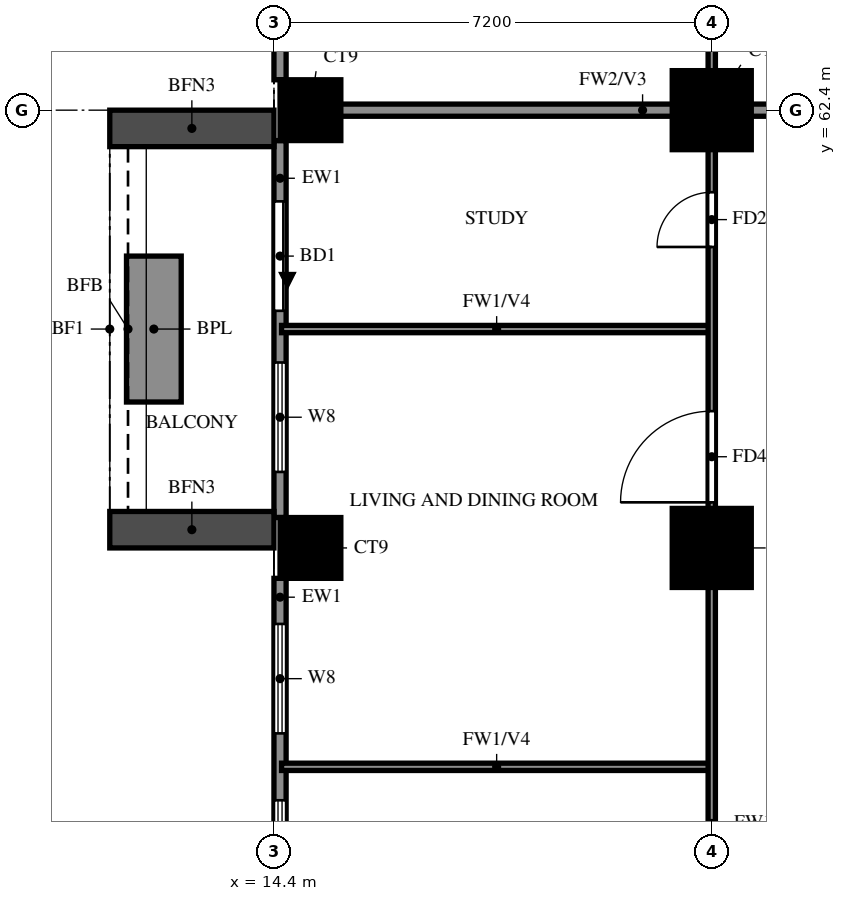
"""IFC4 building model, lengths in metres.
Left out: names, types, materials, properties, quantities, classifications, styles, units other than length and angle.
Written with IfcOpenShell. Run it as: python <this file> out.ifc"""

import sys

from ifc_helpers import new_model, si_unit, direction, frame, frame_2d, origin, origin_2d, place, context, subcontext, project, spatial, rectangle, extrude, source, transform, mapped, element, fill, save


model = new_model("IFC4")
c1 = context("Model", 3, precision=1e-05, world=origin(), true_north=direction((0.0, 1.0)))
c2 = subcontext(c1, "Body", "Model", "MODEL_VIEW")
j1 = project(units=[si_unit("LENGTHUNIT", "METRE"), si_unit("PLANEANGLEUNIT", "RADIAN")], contexts=[c1])
p1 = place(None, origin())
s1 = spatial("IfcSite", under=j1, at=p1, CompositionType="ELEMENT")
p2 = place(p1, origin())
s2 = spatial("IfcBuilding", under=s1, at=p2, CompositionType="ELEMENT")
p3 = place(p2, frame((0.0, 0.0, 90.0)))
s3 = spatial("IfcBuildingStorey", under=s2, at=p3, CompositionType="ELEMENT", Elevation=90.0)
m1 = source(origin(), c2, "Body", "SweptSolid", [
    extrude(rectangle(XDim=1.0, YDim=1.0, at=origin_2d()), origin(), (0.0, 0.0, 1.0), 3.18),
])
p4 = place(p3, frame((15.0, 55.2, 0.0), z_axis=(0.0, 0.0, 1.0), x_axis=(1.0, 0.0, 0.0)))
e1 = element("IfcColumn", 1, at=p4, inside=s3, PredefinedType="COLUMN", context=c2, shape_type="MappedRepresentation", body=[
    mapped(m1, transform((0.0, 0.0, 0.0))),
])
m2 = source(origin(), c2, "Body", "SweptSolid", [
    extrude(rectangle(XDim=1.3, YDim=1.3, at=origin_2d()), origin(), (0.0, 0.0, 1.0), 3.18),
])
p5 = place(p3, frame((21.6, 55.2, 0.0), z_axis=(0.0, 0.0, 1.0), x_axis=(1.0, 0.0, 0.0)))
e2 = element("IfcColumn", 2, at=p5, inside=s3, PredefinedType="COLUMN", context=c2, shape_type="MappedRepresentation", body=[
    mapped(m2, transform((0.0, 0.0, 0.0))),
])
p6 = place(p3, frame((15.0, 62.4, 0.0), z_axis=(0.0, 0.0, 1.0), x_axis=(1.0, 0.0, 0.0)))
e3 = element("IfcColumn", 3, at=p6, inside=s3, PredefinedType="COLUMN", context=c2, shape_type="MappedRepresentation", body=[
    mapped(m1, transform((0.0, 0.0, 0.0))),
])
p7 = place(p3, frame((21.6, 62.4, 0.0), z_axis=(0.0, 0.0, 1.0), x_axis=(1.0, 0.0, 0.0)))
e4 = element("IfcColumn", 4, at=p7, inside=s3, PredefinedType="COLUMN", context=c2, shape_type="MappedRepresentation", body=[
    mapped(m2, transform((0.0, 0.0, 0.0))),
])
p8 = place(p3, frame((14.5, 69.1, 0.0), z_axis=(0.0, 0.0, 1.0), x_axis=(0.0, -1.0, 0.0)))
e5 = element("IfcWall", 5, at=p8, inside=s3, PredefinedType="SOLIDWALL", context=c2, shape_type="SweptSolid", body=[
    extrude(rectangle(XDim=6.2, YDim=0.2, at=frame_2d((3.1, 0.0))), origin(), (0.0, 0.0, 1.0), 3.18),
])
p9 = place(p8, frame((3.65, 0.0, 0.6)))
e6 = element("IfcOpeningElement", 6, at=p9, cuts=e5, PredefinedType="OPENING", context=c2, shape_type="SweptSolid", body=[
    extrude(rectangle(XDim=1.8, YDim=2.4, at=frame_2d((0.9, 1.2))), frame((0.0, 0.11, 0.0), z_axis=(0.0, -1.0, 0.0), x_axis=(1.0, 0.0, 0.0)), (0.0, 0.0, 1.0), 0.22),
])
p10 = place(p8, frame((1.2, 0.0, 1.5)))
e7 = element("IfcOpeningElement", 7, at=p10, cuts=e5, PredefinedType="OPENING", context=c2, shape_type="SweptSolid", body=[
    extrude(rectangle(XDim=0.9, YDim=0.9, at=frame_2d((0.45, 0.45))), frame((0.0, 0.11, 0.0), z_axis=(0.0, -1.0, 0.0), x_axis=(1.0, 0.0, 0.0)), (0.0, 0.0, 1.0), 0.22),
])
p11 = place(p3, frame((14.5, 61.9, 0.0), z_axis=(0.0, 0.0, 1.0), x_axis=(0.0, -1.0, 0.0)))
e8 = element("IfcWall", 8, at=p11, inside=s3, PredefinedType="SOLIDWALL", context=c2, shape_type="SweptSolid", body=[
    extrude(rectangle(XDim=6.2, YDim=0.2, at=frame_2d((3.1, 0.0))), origin(), (0.0, 0.0, 1.0), 3.18),
])
p12 = place(p11, frame((1.0, 0.0, 0.0)))
e9 = element("IfcOpeningElement", 9, at=p12, cuts=e8, PredefinedType="OPENING", context=c2, shape_type="SweptSolid", body=[
    extrude(rectangle(XDim=1.8, YDim=2.4, at=frame_2d((0.9, 1.2))), frame((0.0, 0.11, 0.0), z_axis=(0.0, -1.0, 0.0), x_axis=(1.0, 0.0, 0.0)), (0.0, 0.0, 1.0), 0.22),
])
p13 = place(p11, frame((3.65, 0.0, 0.6)))
e10 = element("IfcOpeningElement", 10, at=p13, cuts=e8, PredefinedType="OPENING", context=c2, shape_type="SweptSolid", body=[
    extrude(rectangle(XDim=1.8, YDim=2.4, at=frame_2d((0.9, 1.2))), frame((0.0, 0.11, 0.0), z_axis=(0.0, -1.0, 0.0), x_axis=(1.0, 0.0, 0.0)), (0.0, 0.0, 1.0), 0.22),
])
p14 = place(p3, frame((14.5, 54.7, 0.0), z_axis=(0.0, 0.0, 1.0), x_axis=(0.0, -1.0, 0.0)))
e11 = element("IfcWall", 11, at=p14, inside=s3, PredefinedType="SOLIDWALL", context=c2, shape_type="SweptSolid", body=[
    extrude(rectangle(XDim=6.2, YDim=0.2, at=frame_2d((3.1, 0.0))), origin(), (0.0, 0.0, 1.0), 3.18),
])
p15 = place(p14, frame((3.65, 0.0, 0.6)))
e12 = element("IfcOpeningElement", 12, at=p15, cuts=e11, PredefinedType="OPENING", context=c2, shape_type="SweptSolid", body=[
    extrude(rectangle(XDim=1.8, YDim=2.4, at=frame_2d((0.9, 1.2))), frame((0.0, 0.11, 0.0), z_axis=(0.0, -1.0, 0.0), x_axis=(1.0, 0.0, 0.0)), (0.0, 0.0, 1.0), 0.22),
])
p16 = place(p14, frame((0.75, 0.0, 0.6)))
e13 = element("IfcOpeningElement", 13, at=p16, cuts=e11, PredefinedType="OPENING", context=c2, shape_type="SweptSolid", body=[
    extrude(rectangle(XDim=1.8, YDim=2.4, at=frame_2d((0.9, 1.2))), frame((0.0, 0.11, 0.0), z_axis=(0.0, -1.0, 0.0), x_axis=(1.0, 0.0, 0.0)), (0.0, 0.0, 1.0), 0.22),
])
for number, where, z_axis, x_axis in (
    (14, (14.4, 62.1, 0.0), (0.0, 0.0, 1.0), (-1.0, 0.0, 0.0)),
    (15, (14.4, 55.5, 0.0), (0.0, 0.0, 1.0), (-1.0, 0.0, 0.0)),
):
    element("IfcWall", number, at=place(p3, frame(where, z_axis=z_axis, x_axis=x_axis)), inside=s3, PredefinedType="SOLIDWALL", context=c2, shape_type="SweptSolid", body=[
        extrude(rectangle(XDim=2.7, YDim=0.6, at=frame_2d((1.35, 0.0))), origin(), (0.0, 0.0, 1.0), 2.85),
    ])
p17 = place(p3, frame((12.425, 60.0, 0.0), z_axis=(0.0, 0.0, 1.0), x_axis=(0.0, -1.0, 0.0)))
e16 = element("IfcWall", 16, at=p17, inside=s3, PredefinedType="SOLIDWALL", context=c2, shape_type="SweptSolid", body=[
    extrude(rectangle(XDim=2.4, YDim=0.9, at=frame_2d((1.2, 0.0))), origin(), (0.0, 0.0, 1.0), 0.9),
])
p18 = place(p3, frame((14.525, 62.4, 0.0), z_axis=(0.0, 0.0, 1.0), x_axis=(1.0, 0.0, 0.0)))
e17 = element("IfcWall", 17, at=p18, inside=s3, PredefinedType="SOLIDWALL", context=c2, shape_type="SweptSolid", body=[
    extrude(rectangle(XDim=11.875, YDim=0.2, at=frame_2d((5.938, 0.0))), origin(), (0.0, 0.0, 1.0), 3.18),
])
for number, where, z_axis, x_axis in (
    (18, (14.525, 51.6, 0.0), (0.0, 0.0, 1.0), (1.0, 0.0, 0.0)),
    (19, (14.525, 58.8, 0.0), (0.0, 0.0, 1.0), (1.0, 0.0, 0.0)),
):
    element("IfcWall", number, at=place(p3, frame(where, z_axis=z_axis, x_axis=x_axis)), inside=s3, PredefinedType="PARTITIONING", context=c2, shape_type="SweptSolid", body=[
        extrude(rectangle(XDim=7.075, YDim=0.12, at=frame_2d((3.538, 0.0))), origin(), (0.0, 0.0, 1.0), 2.28),
    ])
p19 = place(p3, frame((21.6, 33.725, 0.0), z_axis=(0.0, 0.0, 1.0), x_axis=(0.0, 1.0, 0.0)))
e20 = element("IfcWall", 20, at=p19, inside=s3, PredefinedType="PARTITIONING", context=c2, shape_type="SweptSolid", body=[
    extrude(rectangle(XDim=32.275, YDim=0.12, at=frame_2d((16.137, 0.0))), origin(), (0.0, 0.0, 1.0), 3.18),
])
p20 = place(p19, frame((7.775, 0.0, 0.0)))
e21 = element("IfcOpeningElement", 21, at=p20, cuts=e20, PredefinedType="OPENING", context=c2, shape_type="SweptSolid", body=[
    extrude(rectangle(XDim=0.9, YDim=2.1, at=frame_2d((0.45, 1.05))), frame((0.0, 0.07, 0.0), z_axis=(0.0, -1.0, 0.0), x_axis=(1.0, 0.0, 0.0)), (0.0, 0.0, 1.0), 0.14),
])
p21 = place(p19, frame((15.625, 0.0, 0.0)))
e22 = element("IfcOpeningElement", 22, at=p21, cuts=e20, PredefinedType="OPENING", context=c2, shape_type="SweptSolid", body=[
    extrude(rectangle(XDim=0.9, YDim=2.1, at=frame_2d((0.45, 1.05))), frame((0.0, 0.07, 0.0), z_axis=(0.0, -1.0, 0.0), x_axis=(1.0, 0.0, 0.0)), (0.0, 0.0, 1.0), 0.14),
])
p22 = place(p19, frame((22.225, 0.0, 0.0)))
e23 = element("IfcOpeningElement", 23, at=p22, cuts=e20, PredefinedType="OPENING", context=c2, shape_type="SweptSolid", body=[
    extrude(rectangle(XDim=1.5, YDim=2.1, at=frame_2d((0.75, 1.05))), frame((0.0, 0.07, 0.0), z_axis=(0.0, -1.0, 0.0), x_axis=(1.0, 0.0, 0.0)), (0.0, 0.0, 1.0), 0.14),
])
p23 = place(p19, frame((26.425, 0.0, 0.0)))
e24 = element("IfcOpeningElement", 24, at=p23, cuts=e20, PredefinedType="OPENING", context=c2, shape_type="SweptSolid", body=[
    extrude(rectangle(XDim=0.9, YDim=2.1, at=frame_2d((0.45, 1.05))), frame((0.0, 0.07, 0.0), z_axis=(0.0, -1.0, 0.0), x_axis=(1.0, 0.0, 0.0)), (0.0, 0.0, 1.0), 0.14),
])
p24 = place(p19, frame((30.025, 0.0, 0.0)))
e25 = element("IfcOpeningElement", 25, at=p24, cuts=e20, PredefinedType="OPENING", context=c2, shape_type="SweptSolid", body=[
    extrude(rectangle(XDim=0.9, YDim=2.1, at=frame_2d((0.45, 1.05))), frame((0.0, 0.07, 0.0), z_axis=(0.0, -1.0, 0.0), x_axis=(1.0, 0.0, 0.0)), (0.0, 0.0, 1.0), 0.14),
])
p25 = place(p12, origin())
e26 = element("IfcDoor", 26, at=p25, inside=s3, OperationType="DOUBLE_DOOR_SLIDING", PredefinedType="DOOR", context=c2, shape_type="SweptSolid", body=[
    extrude(rectangle(XDim=1.8, YDim=2.4, at=frame_2d((0.9, 1.2))), frame((0.0, 0.025, 0.0), z_axis=(0.0, -1.0, 0.0), x_axis=(1.0, 0.0, 0.0)), (0.0, 0.0, 1.0), 0.05),
])
fill(e9, e26)
p26 = place(p13, origin())
e27 = element("IfcWindow", 27, at=p26, inside=s3, PartitioningType="DOUBLE_PANEL_VERTICAL", PredefinedType="WINDOW", context=c2, shape_type="SweptSolid", body=[
    extrude(rectangle(XDim=1.8, YDim=2.4, at=frame_2d((0.9, 1.2))), frame((0.0, 0.03, 0.0), z_axis=(0.0, -1.0, 0.0), x_axis=(1.0, 0.0, 0.0)), (0.0, 0.0, 1.0), 0.06),
])
fill(e10, e27)
p27 = place(p15, origin())
e28 = element("IfcWindow", 28, at=p27, inside=s3, PartitioningType="DOUBLE_PANEL_VERTICAL", PredefinedType="WINDOW", context=c2, shape_type="SweptSolid", body=[
    extrude(rectangle(XDim=1.8, YDim=2.4, at=frame_2d((0.9, 1.2))), frame((0.0, 0.03, 0.0), z_axis=(0.0, -1.0, 0.0), x_axis=(1.0, 0.0, 0.0)), (0.0, 0.0, 1.0), 0.06),
])
fill(e12, e28)
p28 = place(p16, origin())
e29 = element("IfcWindow", 29, at=p28, inside=s3, PartitioningType="DOUBLE_PANEL_VERTICAL", PredefinedType="WINDOW", context=c2, shape_type="SweptSolid", body=[
    extrude(rectangle(XDim=1.8, YDim=2.4, at=frame_2d((0.9, 1.2))), frame((0.0, 0.03, 0.0), z_axis=(0.0, -1.0, 0.0), x_axis=(1.0, 0.0, 0.0)), (0.0, 0.0, 1.0), 0.06),
])
fill(e13, e29)
p29 = place(p22, origin())
e30 = element("IfcDoor", 30, at=p29, inside=s3, OperationType="SINGLE_SWING_RIGHT", PredefinedType="DOOR", context=c2, shape_type="SweptSolid", body=[
    extrude(rectangle(XDim=1.5, YDim=2.1, at=frame_2d((0.75, 1.05))), frame((0.0, 0.025, 0.0), z_axis=(0.0, -1.0, 0.0), x_axis=(1.0, 0.0, 0.0)), (0.0, 0.0, 1.0), 0.05),
])
fill(e23, e30)
p30 = place(p23, origin())
e31 = element("IfcDoor", 31, at=p30, inside=s3, OperationType="SINGLE_SWING_LEFT", PredefinedType="DOOR", context=c2, shape_type="SweptSolid", body=[
    extrude(rectangle(XDim=0.9, YDim=2.1, at=frame_2d((0.45, 1.05))), frame((0.0, 0.025, 0.0), z_axis=(0.0, -1.0, 0.0), x_axis=(1.0, 0.0, 0.0)), (0.0, 0.0, 1.0), 0.05),
])
fill(e24, e31)
save(model, sys.argv[1])
